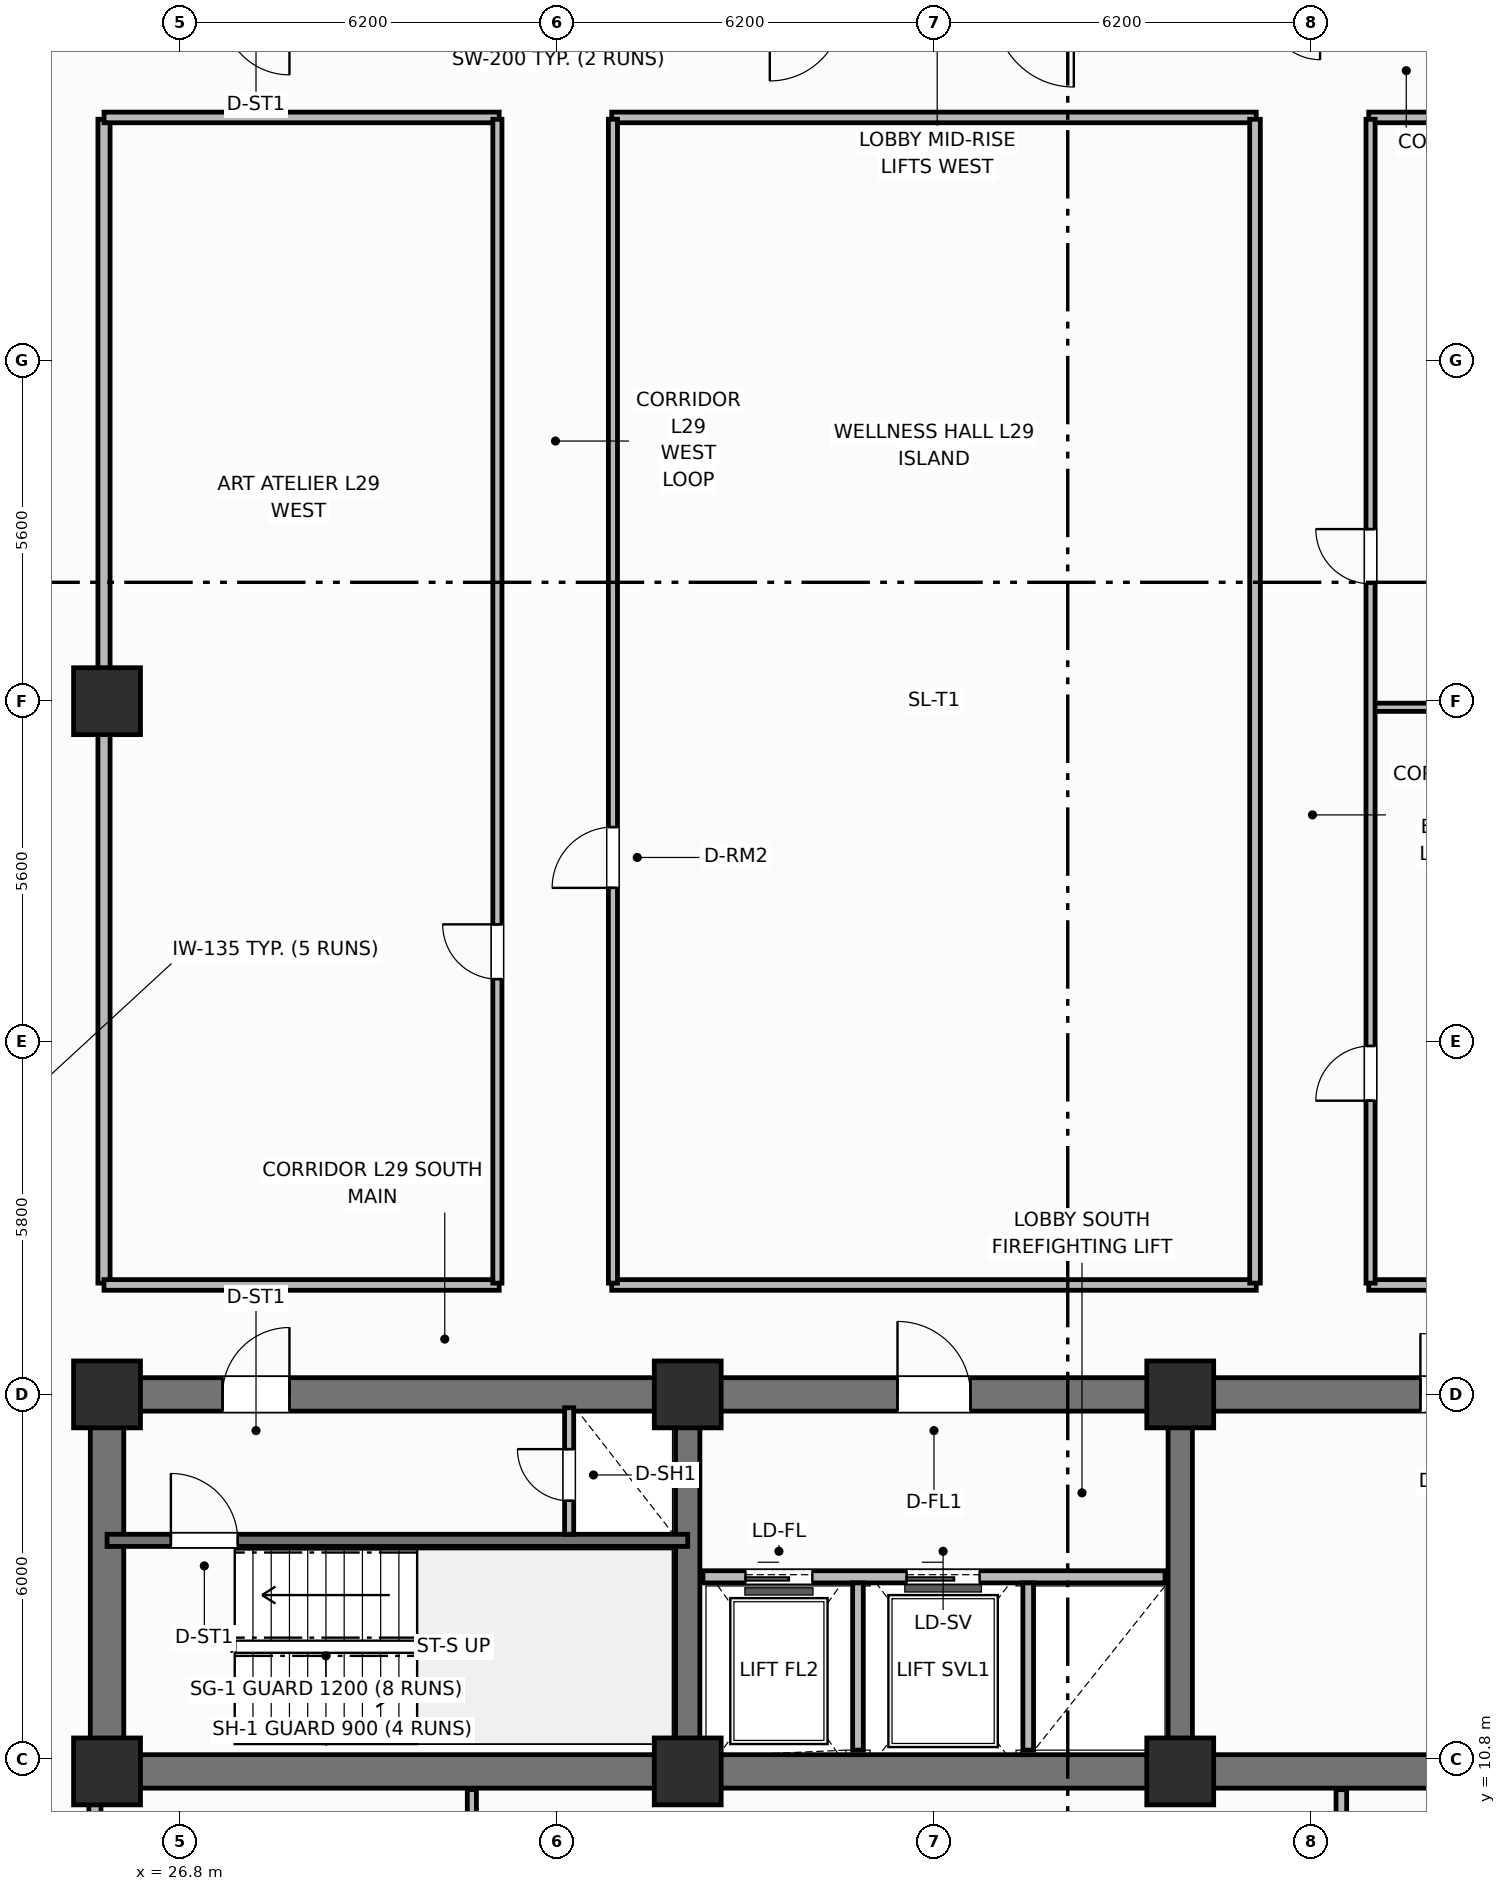
"""IFC4 building model, lengths in metres.
Left out: names, types, materials, properties, quantities, classifications, styles, units other than length and angle.
Written with IfcOpenShell. Run it as: python <this file> out.ifc"""

import sys

from ifc_helpers import new_model, si_unit, direction, frame, frame_2d, origin, origin_2d, place, context, subcontext, project, spatial, rectangle, extrude, element, fill, save


model = new_model("IFC4")
c1 = context("Model", 3, precision=1e-05, world=origin(), true_north=direction((0.0, 1.0)))
c2 = subcontext(c1, "Body", "Model", "MODEL_VIEW")
j1 = project(units=[si_unit("LENGTHUNIT", "METRE"), si_unit("PLANEANGLEUNIT", "RADIAN")], contexts=[c1])
p1 = place(None, origin())
s1 = spatial("IfcSite", under=j1, at=p1, CompositionType="ELEMENT")
p2 = place(p1, origin())
s2 = spatial("IfcBuilding", under=s1, at=p2, CompositionType="ELEMENT")
p3 = place(p2, frame((0.0, 0.0, 117.9)))
s3 = spatial("IfcBuildingStorey", under=s2, at=p3, CompositionType="ELEMENT", Elevation=117.9)
p4 = place(p3, frame((52.8, 10.6, 0.0), z_axis=(0.0, 0.0, 1.0), x_axis=(-1.0, 0.0, 0.0)))
e1 = element("IfcWall", 1, at=p4, inside=s3, PredefinedType="SHEAR", context=c2, shape_type="SweptSolid", body=[
    extrude(rectangle(XDim=27.2, YDim=0.55, at=frame_2d((13.6, 0.0))), origin(), (0.0, 0.0, 1.0), 3.7),
])
p5 = place(p3, frame((25.6, 10.875, 0.0), z_axis=(0.0, 0.0, 1.0), x_axis=(0.0, 1.0, 0.0)))
e2 = element("IfcWall", 2, at=p5, inside=s3, PredefinedType="SHEAR", context=c2, shape_type="SweptSolid", body=[
    extrude(rectangle(XDim=5.65, YDim=0.55, at=frame_2d((2.825, 0.0))), origin(), (0.0, 0.0, 1.0), 3.7),
])
p6 = place(p3, frame((25.6, 16.8, 0.0), z_axis=(0.0, 0.0, 1.0), x_axis=(1.0, 0.0, 0.0)))
e3 = element("IfcWall", 3, at=p6, inside=s3, PredefinedType="SHEAR", context=c2, shape_type="SweptSolid", body=[
    extrude(rectangle(XDim=27.2, YDim=0.55, at=frame_2d((13.6, 0.0))), origin(), (0.0, 0.0, 1.0), 3.7),
])
p7 = place(p6, frame((1.9, 0.0, 0.0)))
e4 = element("IfcOpeningElement", 4, at=p7, cuts=e3, PredefinedType="OPENING", context=c2, shape_type="SweptSolid", body=[
    extrude(rectangle(XDim=1.1, YDim=2.15, at=frame_2d((0.55, 1.075))), frame((0.0, 0.285, 0.0), z_axis=(0.0, -1.0, 0.0), x_axis=(1.0, 0.0, 0.0)), (0.0, 0.0, 1.0), 0.57),
])
p8 = place(p6, frame((13.0, 0.0, 0.0)))
e5 = element("IfcOpeningElement", 5, at=p8, cuts=e3, PredefinedType="OPENING", context=c2, shape_type="SweptSolid", body=[
    extrude(rectangle(XDim=1.2, YDim=2.15, at=frame_2d((0.6, 1.075))), frame((0.0, 0.285, 0.0), z_axis=(0.0, -1.0, 0.0), x_axis=(1.0, 0.0, 0.0)), (0.0, 0.0, 1.0), 0.57),
])
p9 = place(p6, frame((21.6, 0.0, 0.0)))
e6 = element("IfcOpeningElement", 6, at=p9, cuts=e3, PredefinedType="OPENING", context=c2, shape_type="SweptSolid", body=[
    extrude(rectangle(XDim=1.0, YDim=2.15, at=frame_2d((0.5, 1.075))), frame((0.0, 0.285, 0.0), z_axis=(0.0, -1.0, 0.0), x_axis=(1.0, 0.0, 0.0)), (0.0, 0.0, 1.0), 0.57),
])
for number, where, z_axis, x_axis in (
    (7, (35.15, 10.875, 0.0), (0.0, 0.0, 1.0), (0.0, 1.0, 0.0)),
    (8, (43.25, 10.875, 0.0), (0.0, 0.0, 1.0), (0.0, 1.0, 0.0)),
):
    element("IfcWall", number, at=place(p3, frame(where, z_axis=z_axis, x_axis=x_axis)), inside=s3, PredefinedType="SHEAR", context=c2, shape_type="SweptSolid", body=[
        extrude(rectangle(XDim=5.65, YDim=0.4, at=frame_2d((2.825, 0.0))), origin(), (0.0, 0.0, 1.0), 3.7),
    ])
for number, where, z_axis, x_axis in (
    (9, (25.6, 10.6, 0.0), (0.0, 0.0, 1.0), (1.0, 0.0, 0.0)),
    (10, (25.6, 16.8, 0.0), (0.0, 0.0, 1.0), (1.0, 0.0, 0.0)),
    (11, (35.15, 10.6, 0.0), (0.0, 0.0, 1.0), (1.0, 0.0, 0.0)),
    (12, (35.15, 16.8, 0.0), (0.0, 0.0, 1.0), (1.0, 0.0, 0.0)),
    (13, (43.25, 10.6, 0.0), (0.0, 0.0, 1.0), (1.0, 0.0, 0.0)),
    (14, (43.25, 16.8, 0.0), (0.0, 0.0, 1.0), (1.0, 0.0, 0.0)),
    (15, (25.6, 28.2, 0.0), (0.0, 0.0, 1.0), (1.0, 0.0, 0.0)),
):
    element("IfcColumn", number, at=place(p3, frame(where, z_axis=z_axis, x_axis=x_axis)), inside=s3, PredefinedType="COLUMN", context=c2, shape_type="SweptSolid", body=[
        extrude(rectangle(XDim=1.1, YDim=1.1, at=origin_2d()), origin(), (0.0, 0.0, 1.0), 3.7),
    ])
p10 = place(p3, frame((25.6, 14.4, 0.0), z_axis=(0.0, 0.0, 1.0), x_axis=(1.0, 0.0, 0.0)))
e16 = element("IfcWall", 16, at=p10, inside=s3, PredefinedType="SHEAR", context=c2, shape_type="SweptSolid", body=[
    extrude(rectangle(XDim=9.55, YDim=0.2, at=frame_2d((4.775, 0.0))), origin(), (0.0, 0.0, 1.0), 3.7),
])
p11 = place(p10, frame((1.05, 0.0, 0.0)))
e17 = element("IfcOpeningElement", 17, at=p11, cuts=e16, PredefinedType="OPENING", context=c2, shape_type="SweptSolid", body=[
    extrude(rectangle(XDim=1.1, YDim=2.15, at=frame_2d((0.55, 1.075))), frame((0.0, 0.11, 0.0), z_axis=(0.0, -1.0, 0.0), x_axis=(1.0, 0.0, 0.0)), (0.0, 0.0, 1.0), 0.22),
])
p12 = place(p3, frame((33.2, 14.5, 0.0), z_axis=(0.0, 0.0, 1.0), x_axis=(0.0, 1.0, 0.0)))
e18 = element("IfcWall", 18, at=p12, inside=s3, PredefinedType="PARTITIONING", context=c2, shape_type="SweptSolid", body=[
    extrude(rectangle(XDim=2.08, YDim=0.15, at=frame_2d((1.04, 0.0))), origin(), (0.0, 0.0, 1.0), 2.53),
])
p13 = place(p12, frame((0.55, 0.0, 0.0)))
e19 = element("IfcOpeningElement", 19, at=p13, cuts=e18, PredefinedType="OPENING", context=c2, shape_type="SweptSolid", body=[
    extrude(rectangle(XDim=0.85, YDim=2.05, at=frame_2d((0.425, 1.025))), frame((0.0, 0.085, 0.0), z_axis=(0.0, -1.0, 0.0), x_axis=(1.0, 0.0, 0.0)), (0.0, 0.0, 1.0), 0.17),
])
p14 = place(p3, frame((35.4, 13.8, 0.0), z_axis=(0.0, 0.0, 1.0), x_axis=(1.0, 0.0, 0.0)))
e20 = element("IfcWall", 20, at=p14, inside=s3, PredefinedType="PARTITIONING", context=c2, shape_type="SweptSolid", body=[
    extrude(rectangle(XDim=7.6, YDim=0.2, at=frame_2d((3.8, 0.0))), origin(), (0.0, 0.0, 1.0), 2.3),
])
p15 = place(p14, frame((0.7, 0.0, 0.0)))
e21 = element("IfcOpeningElement", 21, at=p15, cuts=e20, PredefinedType="OPENING", context=c2, shape_type="SweptSolid", body=[
    extrude(rectangle(XDim=1.1, YDim=2.15, at=frame_2d((0.55, 1.075))), frame((0.0, 0.11, 0.0), z_axis=(0.0, -1.0, 0.0), x_axis=(1.0, 0.0, 0.0)), (0.0, 0.0, 1.0), 0.22),
])
p16 = place(p14, frame((3.35, 0.0, 0.0)))
e22 = element("IfcOpeningElement", 22, at=p16, cuts=e20, PredefinedType="OPENING", context=c2, shape_type="SweptSolid", body=[
    extrude(rectangle(XDim=1.2, YDim=2.15, at=frame_2d((0.6, 1.075))), frame((0.0, 0.11, 0.0), z_axis=(0.0, -1.0, 0.0), x_axis=(1.0, 0.0, 0.0)), (0.0, 0.0, 1.0), 0.22),
])
for number, where, z_axis, x_axis in (
    (23, (37.95, 10.95, 0.0), (0.0, 0.0, 1.0), (0.0, 1.0, 0.0)),
    (24, (40.75, 10.95, 0.0), (0.0, 0.0, 1.0), (0.0, 1.0, 0.0)),
):
    element("IfcWall", number, at=place(p3, frame(where, z_axis=z_axis, x_axis=x_axis)), inside=s3, PredefinedType="PARTITIONING", context=c2, shape_type="SweptSolid", body=[
        extrude(rectangle(XDim=2.75, YDim=0.175, at=frame_2d((1.375, 0.0))), origin(), (0.0, 0.0, 1.0), 2.53),
    ])
p17 = place(p3, frame((25.55, 18.63, 0.0), z_axis=(0.0, 0.0, 1.0), x_axis=(0.0, 1.0, 0.0)))
e25 = element("IfcWall", 25, at=p17, inside=s3, PredefinedType="PARTITIONING", context=c2, shape_type="SweptSolid", body=[
    extrude(rectangle(XDim=19.14, YDim=0.2, at=frame_2d((9.57, 0.0))), origin(), (0.0, 0.0, 1.0), 2.53),
])
for number, where, z_axis, x_axis in (
    (26, (25.55, 18.6, 0.0), (0.0, 0.0, 1.0), (1.0, 0.0, 0.0)),
    (27, (25.55, 37.8, 0.0), (0.0, 0.0, 1.0), (1.0, 0.0, 0.0)),
):
    element("IfcWall", number, at=place(p3, frame(where, z_axis=z_axis, x_axis=x_axis)), inside=s3, PredefinedType="PARTITIONING", context=c2, shape_type="SweptSolid", body=[
        extrude(rectangle(XDim=6.5, YDim=0.175, at=frame_2d((3.25, 0.0))), origin(), (0.0, 0.0, 1.0), 2.53),
    ])
for number, where, z_axis, x_axis in (
    (28, (33.9, 18.6, 0.0), (0.0, 0.0, 1.0), (1.0, 0.0, 0.0)),
    (29, (33.9, 37.8, 0.0), (0.0, 0.0, 1.0), (1.0, 0.0, 0.0)),
):
    element("IfcWall", number, at=place(p3, frame(where, z_axis=z_axis, x_axis=x_axis)), inside=s3, PredefinedType="PARTITIONING", context=c2, shape_type="SweptSolid", body=[
        extrude(rectangle(XDim=10.6, YDim=0.175, at=frame_2d((5.3, 0.0))), origin(), (0.0, 0.0, 1.0), 2.53),
    ])
for number, where, z_axis, x_axis in (
    (30, (46.35, 18.6, 0.0), (0.0, 0.0, 1.0), (1.0, 0.0, 0.0)),
    (31, (46.35, 37.8, 0.0), (0.0, 0.0, 1.0), (1.0, 0.0, 0.0)),
):
    element("IfcWall", number, at=place(p3, frame(where, z_axis=z_axis, x_axis=x_axis)), inside=s3, PredefinedType="PARTITIONING", context=c2, shape_type="SweptSolid", body=[
        extrude(rectangle(XDim=6.5, YDim=0.175, at=frame_2d((3.25, 0.0))), origin(), (0.0, 0.0, 1.0), 2.53),
    ])
p18 = place(p3, frame((46.38, 28.1, 0.0), z_axis=(0.0, 0.0, 1.0), x_axis=(1.0, 0.0, 0.0)))
e32 = element("IfcWall", 32, at=p18, inside=s3, PredefinedType="PARTITIONING", context=c2, shape_type="SweptSolid", body=[
    extrude(rectangle(XDim=6.42, YDim=0.135, at=frame_2d((3.21, 0.0))), origin(), (0.0, 0.0, 1.0), 2.53),
])
p19 = place(p3, frame((32.02, 18.63, 0.0), z_axis=(0.0, 0.0, 1.0), x_axis=(0.0, 1.0, 0.0)))
e33 = element("IfcWall", 33, at=p19, inside=s3, PredefinedType="PARTITIONING", context=c2, shape_type="SweptSolid", body=[
    extrude(rectangle(XDim=19.14, YDim=0.15, at=frame_2d((9.57, 0.0))), origin(), (0.0, 0.0, 1.0), 2.53),
])
p20 = place(p19, frame((5.0, 0.0, 0.0)))
e34 = element("IfcOpeningElement", 34, at=p20, cuts=e33, PredefinedType="OPENING", context=c2, shape_type="SweptSolid", body=[
    extrude(rectangle(XDim=0.9, YDim=2.1, at=frame_2d((0.45, 1.05))), frame((0.0, 0.085, 0.0), z_axis=(0.0, -1.0, 0.0), x_axis=(1.0, 0.0, 0.0)), (0.0, 0.0, 1.0), 0.17),
])
p21 = place(p3, frame((33.92, 18.63, 0.0), z_axis=(0.0, 0.0, 1.0), x_axis=(0.0, 1.0, 0.0)))
e35 = element("IfcWall", 35, at=p21, inside=s3, PredefinedType="PARTITIONING", context=c2, shape_type="SweptSolid", body=[
    extrude(rectangle(XDim=19.14, YDim=0.15, at=frame_2d((9.57, 0.0))), origin(), (0.0, 0.0, 1.0), 2.53),
])
p22 = place(p21, frame((6.5, 0.0, 0.0)))
e36 = element("IfcOpeningElement", 36, at=p22, cuts=e35, PredefinedType="OPENING", context=c2, shape_type="SweptSolid", body=[
    extrude(rectangle(XDim=1.0, YDim=2.15, at=frame_2d((0.5, 1.075))), frame((0.0, 0.085, 0.0), z_axis=(0.0, -1.0, 0.0), x_axis=(1.0, 0.0, 0.0)), (0.0, 0.0, 1.0), 0.17),
])
p23 = place(p3, frame((44.48, 18.63, 0.0), z_axis=(0.0, 0.0, 1.0), x_axis=(0.0, 1.0, 0.0)))
e37 = element("IfcWall", 37, at=p23, inside=s3, PredefinedType="PARTITIONING", context=c2, shape_type="SweptSolid", body=[
    extrude(rectangle(XDim=19.14, YDim=0.175, at=frame_2d((9.57, 0.0))), origin(), (0.0, 0.0, 1.0), 2.53),
])
p24 = place(p3, frame((46.38, 18.63, 0.0), z_axis=(0.0, 0.0, 1.0), x_axis=(0.0, 1.0, 0.0)))
e38 = element("IfcWall", 38, at=p24, inside=s3, PredefinedType="PARTITIONING", context=c2, shape_type="SweptSolid", body=[
    extrude(rectangle(XDim=19.14, YDim=0.15, at=frame_2d((9.57, 0.0))), origin(), (0.0, 0.0, 1.0), 2.53),
])
p25 = place(p24, frame((3.0, 0.0, 0.0)))
e39 = element("IfcOpeningElement", 39, at=p25, cuts=e38, PredefinedType="OPENING", context=c2, shape_type="SweptSolid", body=[
    extrude(rectangle(XDim=0.9, YDim=2.1, at=frame_2d((0.45, 1.05))), frame((0.0, 0.085, 0.0), z_axis=(0.0, -1.0, 0.0), x_axis=(1.0, 0.0, 0.0)), (0.0, 0.0, 1.0), 0.17),
])
p26 = place(p24, frame((11.5, 0.0, 0.0)))
e40 = element("IfcOpeningElement", 40, at=p26, cuts=e38, PredefinedType="OPENING", context=c2, shape_type="SweptSolid", body=[
    extrude(rectangle(XDim=0.9, YDim=2.1, at=frame_2d((0.45, 1.05))), frame((0.0, 0.085, 0.0), z_axis=(0.0, -1.0, 0.0), x_axis=(1.0, 0.0, 0.0)), (0.0, 0.0, 1.0), 0.17),
])
p27 = place(p3, frame((31.6, 4.97, 0.0), z_axis=(0.0, 0.0, 1.0), x_axis=(0.0, 1.0, 0.0)))
e41 = element("IfcWall", 41, at=p27, inside=s3, PredefinedType="PARTITIONING", context=c2, shape_type="SweptSolid", body=[
    extrude(rectangle(XDim=5.33, YDim=0.15, at=frame_2d((2.665, 0.0))), origin(), (0.0, 0.0, 1.0), 2.53),
])
p28 = place(p27, frame((1.45, 0.0, 0.0)))
e42 = element("IfcOpeningElement", 42, at=p28, cuts=e41, PredefinedType="OPENING", context=c2, shape_type="SweptSolid", body=[
    extrude(rectangle(XDim=0.9, YDim=2.1, at=frame_2d((0.45, 1.05))), frame((0.0, 0.085, 0.0), z_axis=(0.0, -1.0, 0.0), x_axis=(1.0, 0.0, 0.0)), (0.0, 0.0, 1.0), 0.17),
])
p29 = place(p3, frame((45.9, 4.97, 0.0), z_axis=(0.0, 0.0, 1.0), x_axis=(0.0, 1.0, 0.0)))
e43 = element("IfcWall", 43, at=p29, inside=s3, PredefinedType="PARTITIONING", context=c2, shape_type="SweptSolid", body=[
    extrude(rectangle(XDim=5.33, YDim=0.175, at=frame_2d((2.665, 0.0))), origin(), (0.0, 0.0, 1.0), 2.53),
])
p30 = place(p3, frame((25.4, 5.77, 0.0), z_axis=(0.0, 0.0, 1.0), x_axis=(0.0, 1.0, 0.0)))
e44 = element("IfcWall", 44, at=p30, inside=s3, PredefinedType="PARTITIONING", context=c2, shape_type="SweptSolid", body=[
    extrude(rectangle(XDim=4.53, YDim=0.2, at=frame_2d((2.265, 0.0))), origin(), (0.0, 0.0, 1.0), 2.53),
])
p31 = place(p30, frame((1.05, 0.0, 0.0)))
e45 = element("IfcOpeningElement", 45, at=p31, cuts=e44, PredefinedType="OPENING", context=c2, shape_type="SweptSolid", body=[
    extrude(rectangle(XDim=0.9, YDim=2.1, at=frame_2d((0.45, 1.05))), frame((0.0, 0.11, 0.0), z_axis=(0.0, -1.0, 0.0), x_axis=(1.0, 0.0, 0.0)), (0.0, 0.0, 1.0), 0.22),
])
p32 = place(p11, origin())
e46 = element("IfcDoor", 46, at=p32, inside=s3, OperationType="SINGLE_SWING_LEFT", PredefinedType="DOOR", context=c2, shape_type="SweptSolid", body=[
    extrude(rectangle(XDim=1.1, YDim=2.15, at=frame_2d((0.55, 1.075))), frame((0.0, 0.025, 0.0), z_axis=(0.0, -1.0, 0.0), x_axis=(1.0, 0.0, 0.0)), (0.0, 0.0, 1.0), 0.05),
])
fill(e17, e46)
p33 = place(p13, origin())
e47 = element("IfcDoor", 47, at=p33, inside=s3, OperationType="SINGLE_SWING_RIGHT", PredefinedType="TRAPDOOR", context=c2, shape_type="SweptSolid", body=[
    extrude(rectangle(XDim=0.85, YDim=2.05, at=frame_2d((0.425, 1.025))), frame((0.0, 0.025, 0.0), z_axis=(0.0, -1.0, 0.0), x_axis=(1.0, 0.0, 0.0)), (0.0, 0.0, 1.0), 0.05),
])
fill(e19, e47)
p34 = place(p15, origin())
e48 = element("IfcDoor", 48, at=p34, inside=s3, OperationType="SLIDING_TO_LEFT", PredefinedType="DOOR", context=c2, shape_type="SweptSolid", body=[
    extrude(rectangle(XDim=1.1, YDim=2.15, at=frame_2d((0.55, 1.075))), frame((0.0, 0.025, 0.0), z_axis=(0.0, -1.0, 0.0), x_axis=(1.0, 0.0, 0.0)), (0.0, 0.0, 1.0), 0.05),
])
fill(e21, e48)
p35 = place(p16, origin())
e49 = element("IfcDoor", 49, at=p35, inside=s3, OperationType="SLIDING_TO_LEFT", PredefinedType="DOOR", context=c2, shape_type="SweptSolid", body=[
    extrude(rectangle(XDim=1.2, YDim=2.15, at=frame_2d((0.6, 1.075))), frame((0.0, 0.025, 0.0), z_axis=(0.0, -1.0, 0.0), x_axis=(1.0, 0.0, 0.0)), (0.0, 0.0, 1.0), 0.05),
])
fill(e22, e49)
p36 = place(p20, origin())
e50 = element("IfcDoor", 50, at=p36, inside=s3, OperationType="SINGLE_SWING_RIGHT", PredefinedType="DOOR", context=c2, shape_type="SweptSolid", body=[
    extrude(rectangle(XDim=0.9, YDim=2.1, at=frame_2d((0.45, 1.05))), frame((0.0, 0.025, 0.0), z_axis=(0.0, -1.0, 0.0), x_axis=(1.0, 0.0, 0.0)), (0.0, 0.0, 1.0), 0.05),
])
fill(e34, e50)
p37 = place(p22, origin())
e51 = element("IfcDoor", 51, at=p37, inside=s3, OperationType="SINGLE_SWING_LEFT", PredefinedType="DOOR", context=c2, shape_type="SweptSolid", body=[
    extrude(rectangle(XDim=1.0, YDim=2.15, at=frame_2d((0.5, 1.075))), frame((0.0, 0.025, 0.0), z_axis=(0.0, -1.0, 0.0), x_axis=(1.0, 0.0, 0.0)), (0.0, 0.0, 1.0), 0.05),
])
fill(e36, e51)
p38 = place(p25, origin())
e52 = element("IfcDoor", 52, at=p38, inside=s3, OperationType="SINGLE_SWING_LEFT", PredefinedType="DOOR", context=c2, shape_type="SweptSolid", body=[
    extrude(rectangle(XDim=0.9, YDim=2.1, at=frame_2d((0.45, 1.05))), frame((0.0, 0.025, 0.0), z_axis=(0.0, -1.0, 0.0), x_axis=(1.0, 0.0, 0.0)), (0.0, 0.0, 1.0), 0.05),
])
fill(e39, e52)
p39 = place(p26, origin())
e53 = element("IfcDoor", 53, at=p39, inside=s3, OperationType="SINGLE_SWING_RIGHT", PredefinedType="DOOR", context=c2, shape_type="SweptSolid", body=[
    extrude(rectangle(XDim=0.9, YDim=2.1, at=frame_2d((0.45, 1.05))), frame((0.0, 0.025, 0.0), z_axis=(0.0, -1.0, 0.0), x_axis=(1.0, 0.0, 0.0)), (0.0, 0.0, 1.0), 0.05),
])
fill(e40, e53)
p40 = place(p7, origin())
e54 = element("IfcDoor", 54, at=p40, inside=s3, OperationType="SINGLE_SWING_RIGHT", PredefinedType="DOOR", context=c2, shape_type="SweptSolid", body=[
    extrude(rectangle(XDim=1.1, YDim=2.15, at=frame_2d((0.55, 1.075))), frame((0.0, 0.025, 0.0), z_axis=(0.0, -1.0, 0.0), x_axis=(1.0, 0.0, 0.0)), (0.0, 0.0, 1.0), 0.05),
])
fill(e4, e54)
p41 = place(p8, origin())
e55 = element("IfcDoor", 55, at=p41, inside=s3, OperationType="SINGLE_SWING_LEFT", PredefinedType="DOOR", context=c2, shape_type="SweptSolid", body=[
    extrude(rectangle(XDim=1.2, YDim=2.15, at=frame_2d((0.6, 1.075))), frame((0.0, 0.025, 0.0), z_axis=(0.0, -1.0, 0.0), x_axis=(1.0, 0.0, 0.0)), (0.0, 0.0, 1.0), 0.05),
])
fill(e5, e55)
p42 = place(p9, origin())
e56 = element("IfcDoor", 56, at=p42, inside=s3, OperationType="SINGLE_SWING_LEFT", PredefinedType="DOOR", context=c2, shape_type="SweptSolid", body=[
    extrude(rectangle(XDim=1.0, YDim=2.15, at=frame_2d((0.5, 1.075))), frame((0.0, 0.025, 0.0), z_axis=(0.0, -1.0, 0.0), x_axis=(1.0, 0.0, 0.0)), (0.0, 0.0, 1.0), 0.05),
])
fill(e6, e56)
save(model, sys.argv[1])
